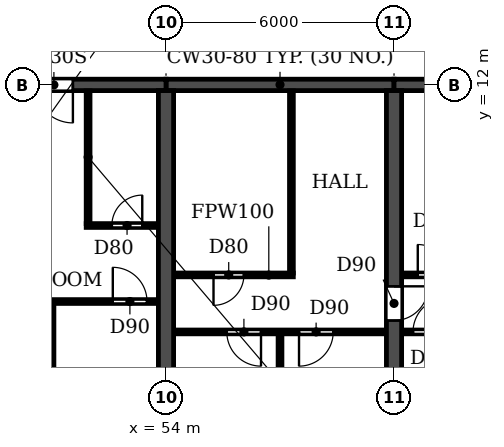
"""IFC4 building model, lengths in metres.
Left out: names, types, materials, properties, quantities, classifications, styles, units other than length and angle.
Written with IfcOpenShell. Run it as: python <this file> out.ifc"""

import sys

from ifc_helpers import new_model, si_unit, direction, frame, frame_2d, origin, place, context, subcontext, project, spatial, rectangle, extrude, element, fill, save


model = new_model("IFC4")
c1 = context("Model", 3, precision=1e-05, world=origin(), true_north=direction((0.0, 1.0)))
c2 = subcontext(c1, "Body", "Model", "MODEL_VIEW")
j1 = project(units=[si_unit("LENGTHUNIT", "METRE"), si_unit("PLANEANGLEUNIT", "RADIAN")], contexts=[c1])
p1 = place(None, origin())
s1 = spatial("IfcSite", under=j1, at=p1, CompositionType="ELEMENT")
p2 = place(p1, origin())
s2 = spatial("IfcBuilding", under=s1, at=p2, CompositionType="ELEMENT")
p3 = place(p2, frame((0.0, 0.0, 23.4)))
s3 = spatial("IfcBuildingStorey", under=s2, at=p3, CompositionType="ELEMENT", Elevation=23.4)
p4 = place(p3, frame((54.0, 0.2, 0.0), z_axis=(0.0, 0.0, 1.0), x_axis=(0.0, 1.0, 0.0)))
e1 = element("IfcWall", 1, at=p4, inside=s3, PredefinedType="SHEAR", context=c2, shape_type="SweptSolid", body=[
    extrude(rectangle(XDim=11.65, YDim=0.4, at=frame_2d((5.825, 0.0))), origin(), (0.0, 0.0, 1.0), 3.05),
])
p5 = place(p3, frame((60.0, 0.2, 0.0), z_axis=(0.0, 0.0, 1.0), x_axis=(0.0, 1.0, 0.0)))
e2 = element("IfcWall", 2, at=p5, inside=s3, PredefinedType="SHEAR", context=c2, shape_type="SweptSolid", body=[
    extrude(rectangle(XDim=11.65, YDim=0.4, at=frame_2d((5.825, 0.0))), origin(), (0.0, 0.0, 1.0), 3.05),
])
p6 = place(p5, frame((5.6, 0.0, 0.0)))
e3 = element("IfcOpeningElement", 3, at=p6, cuts=e2, PredefinedType="OPENING", context=c2, shape_type="SweptSolid", body=[
    extrude(rectangle(XDim=0.9, YDim=2.1, at=frame_2d((0.45, 1.05))), frame((0.0, 0.21, 0.0), z_axis=(0.0, -1.0, 0.0), x_axis=(1.0, 0.0, 0.0)), (0.0, 0.0, 1.0), 0.42),
])
p7 = place(p3, frame((48.0, 12.0, 0.0), z_axis=(0.0, 0.0, 1.0), x_axis=(1.0, 0.0, 0.0)))
e4 = element("IfcWall", 4, at=p7, inside=s3, PredefinedType="SHEAR", context=c2, shape_type="SweptSolid", body=[
    extrude(rectangle(XDim=6.0, YDim=0.3, at=frame_2d((3.0, 0.0))), origin(), (0.0, 0.0, 1.0), 2.45),
])
p8 = place(p7, frame((2.55, 0.0, 0.0)))
e5 = element("IfcOpeningElement", 5, at=p8, cuts=e4, PredefinedType="OPENING", context=c2, shape_type="SweptSolid", body=[
    extrude(rectangle(XDim=1.0, YDim=2.1, at=frame_2d((0.5, 1.05))), frame((0.0, 0.16, 0.0), z_axis=(0.0, -1.0, 0.0), x_axis=(1.0, 0.0, 0.0)), (0.0, 0.0, 1.0), 0.32),
])
p9 = place(p3, frame((54.0, 12.0, 0.0), z_axis=(0.0, 0.0, 1.0), x_axis=(1.0, 0.0, 0.0)))
e6 = element("IfcWall", 6, at=p9, inside=s3, PredefinedType="SHEAR", context=c2, shape_type="SweptSolid", body=[
    extrude(rectangle(XDim=6.0, YDim=0.3, at=frame_2d((3.0, 0.0))), origin(), (0.0, 0.0, 1.0), 2.45),
])
p10 = place(p3, frame((60.0, 12.0, 0.0), z_axis=(0.0, 0.0, 1.0), x_axis=(1.0, 0.0, 0.0)))
e7 = element("IfcWall", 7, at=p10, inside=s3, PredefinedType="SHEAR", context=c2, shape_type="SweptSolid", body=[
    extrude(rectangle(XDim=6.0, YDim=0.3, at=frame_2d((3.0, 0.0))), origin(), (0.0, 0.0, 1.0), 2.45),
])
p11 = place(p10, frame((2.45, 0.0, 0.0)))
e8 = element("IfcOpeningElement", 8, at=p11, cuts=e7, PredefinedType="OPENING", context=c2, shape_type="SweptSolid", body=[
    extrude(rectangle(XDim=1.0, YDim=2.1, at=frame_2d((0.5, 1.05))), frame((0.0, 0.16, 0.0), z_axis=(0.0, -1.0, 0.0), x_axis=(1.0, 0.0, 0.0)), (0.0, 0.0, 1.0), 0.32),
])
p12 = place(p3, frame((54.21, 5.5, 0.0), z_axis=(0.0, 0.0, 1.0), x_axis=(1.0, 0.0, 0.0)))
e9 = element("IfcWall", 9, at=p12, inside=s3, PredefinedType="PARTITIONING", context=c2, shape_type="SweptSolid", body=[
    extrude(rectangle(XDim=5.58, YDim=0.1, at=frame_2d((2.79, 0.0))), origin(), (0.0, 0.0, 1.0), 3.05),
])
p13 = place(p12, frame((1.39, 0.0, 0.0)))
e10 = element("IfcOpeningElement", 10, at=p13, cuts=e9, PredefinedType="OPENING", context=c2, shape_type="SweptSolid", body=[
    extrude(rectangle(XDim=0.9, YDim=2.1, at=frame_2d((0.45, 1.05))), frame((0.0, 0.06, 0.0), z_axis=(0.0, -1.0, 0.0), x_axis=(1.0, 0.0, 0.0)), (0.0, 0.0, 1.0), 0.12),
])
p14 = place(p12, frame((3.29, 0.0, 0.0)))
e11 = element("IfcOpeningElement", 11, at=p14, cuts=e9, PredefinedType="OPENING", context=c2, shape_type="SweptSolid", body=[
    extrude(rectangle(XDim=0.9, YDim=2.1, at=frame_2d((0.45, 1.05))), frame((0.0, 0.06, 0.0), z_axis=(0.0, -1.0, 0.0), x_axis=(1.0, 0.0, 0.0)), (0.0, 0.0, 1.0), 0.12),
])
p15 = place(p3, frame((60.21, 5.5, 0.0), z_axis=(0.0, 0.0, 1.0), x_axis=(1.0, 0.0, 0.0)))
e12 = element("IfcWall", 12, at=p15, inside=s3, PredefinedType="PARTITIONING", context=c2, shape_type="SweptSolid", body=[
    extrude(rectangle(XDim=2.84, YDim=0.1, at=frame_2d((1.42, 0.0))), origin(), (0.0, 0.0, 1.0), 3.05),
])
p16 = place(p15, frame((0.29, 0.0, 0.0)))
e13 = element("IfcOpeningElement", 13, at=p16, cuts=e12, PredefinedType="OPENING", context=c2, shape_type="SweptSolid", body=[
    extrude(rectangle(XDim=0.9, YDim=2.1, at=frame_2d((0.45, 1.05))), frame((0.0, 0.06, 0.0), z_axis=(0.0, -1.0, 0.0), x_axis=(1.0, 0.0, 0.0)), (0.0, 0.0, 1.0), 0.12),
])
p17 = place(p3, frame((50.95, 6.3, 0.0), z_axis=(0.0, 0.0, 1.0), x_axis=(1.0, 0.0, 0.0)))
e14 = element("IfcWall", 14, at=p17, inside=s3, PredefinedType="PARTITIONING", context=c2, shape_type="SweptSolid", body=[
    extrude(rectangle(XDim=2.84, YDim=0.1, at=frame_2d((1.42, 0.0))), origin(), (0.0, 0.0, 1.0), 3.05),
])
p18 = place(p17, frame((1.65, 0.0, 0.0)))
e15 = element("IfcOpeningElement", 15, at=p18, cuts=e14, PredefinedType="OPENING", context=c2, shape_type="SweptSolid", body=[
    extrude(rectangle(XDim=0.9, YDim=2.1, at=frame_2d((0.45, 1.05))), frame((0.0, 0.06, 0.0), z_axis=(0.0, -1.0, 0.0), x_axis=(1.0, 0.0, 0.0)), (0.0, 0.0, 1.0), 0.12),
])
p19 = place(p3, frame((54.21, 7.0, 0.0), z_axis=(0.0, 0.0, 1.0), x_axis=(1.0, 0.0, 0.0)))
e16 = element("IfcWall", 16, at=p19, inside=s3, PredefinedType="PARTITIONING", context=c2, shape_type="SweptSolid", body=[
    extrude(rectangle(XDim=3.14, YDim=0.1, at=frame_2d((1.57, 0.0))), origin(), (0.0, 0.0, 1.0), 3.05),
])
p20 = place(p19, frame((1.04, 0.0, 0.0)))
e17 = element("IfcOpeningElement", 17, at=p20, cuts=e16, PredefinedType="OPENING", context=c2, shape_type="SweptSolid", body=[
    extrude(rectangle(XDim=0.8, YDim=2.1, at=frame_2d((0.4, 1.05))), frame((0.0, 0.06, 0.0), z_axis=(0.0, -1.0, 0.0), x_axis=(1.0, 0.0, 0.0)), (0.0, 0.0, 1.0), 0.12),
])
p21 = place(p3, frame((60.21, 7.0, 0.0), z_axis=(0.0, 0.0, 1.0), x_axis=(1.0, 0.0, 0.0)))
e18 = element("IfcWall", 18, at=p21, inside=s3, PredefinedType="PARTITIONING", context=c2, shape_type="SweptSolid", body=[
    extrude(rectangle(XDim=1.89, YDim=0.1, at=frame_2d((0.945, 0.0))), origin(), (0.0, 0.0, 1.0), 3.05),
])
p22 = place(p21, frame((0.415, 0.0, 0.0)))
e19 = element("IfcOpeningElement", 19, at=p22, cuts=e18, PredefinedType="OPENING", context=c2, shape_type="SweptSolid", body=[
    extrude(rectangle(XDim=0.8, YDim=2.1, at=frame_2d((0.4, 1.05))), frame((0.0, 0.06, 0.0), z_axis=(0.0, -1.0, 0.0), x_axis=(1.0, 0.0, 0.0)), (0.0, 0.0, 1.0), 0.12),
])
p23 = place(p3, frame((51.9, 8.3, 0.0), z_axis=(0.0, 0.0, 1.0), x_axis=(1.0, 0.0, 0.0)))
e20 = element("IfcWall", 20, at=p23, inside=s3, PredefinedType="PARTITIONING", context=c2, shape_type="SweptSolid", body=[
    extrude(rectangle(XDim=1.89, YDim=0.1, at=frame_2d((0.945, 0.0))), origin(), (0.0, 0.0, 1.0), 3.05),
])
p24 = place(p23, frame((0.675, 0.0, 0.0)))
e21 = element("IfcOpeningElement", 21, at=p24, cuts=e20, PredefinedType="OPENING", context=c2, shape_type="SweptSolid", body=[
    extrude(rectangle(XDim=0.8, YDim=2.1, at=frame_2d((0.4, 1.05))), frame((0.0, 0.06, 0.0), z_axis=(0.0, -1.0, 0.0), x_axis=(1.0, 0.0, 0.0)), (0.0, 0.0, 1.0), 0.12),
])
p25 = place(p3, frame((51.0, 0.06, 0.0), z_axis=(0.0, 0.0, 1.0), x_axis=(0.0, 1.0, 0.0)))
e22 = element("IfcWall", 22, at=p25, inside=s3, PredefinedType="PARTITIONING", context=c2, shape_type="SweptSolid", body=[
    extrude(rectangle(XDim=6.19, YDim=0.1, at=frame_2d((3.095, 0.0))), origin(), (0.0, 0.0, 1.0), 3.05),
])
p26 = place(p3, frame((51.95, 8.35, 0.0), z_axis=(0.0, 0.0, 1.0), x_axis=(0.0, 1.0, 0.0)))
e23 = element("IfcWall", 23, at=p26, inside=s3, PredefinedType="PARTITIONING", context=c2, shape_type="SweptSolid", body=[
    extrude(rectangle(XDim=3.49, YDim=0.1, at=frame_2d((1.745, 0.0))), origin(), (0.0, 0.0, 1.0), 3.05),
])
p27 = place(p3, frame((57.0, 0.06, 0.0), z_axis=(0.0, 0.0, 1.0), x_axis=(0.0, 1.0, 0.0)))
e24 = element("IfcWall", 24, at=p27, inside=s3, PredefinedType="PARTITIONING", context=c2, shape_type="SweptSolid", body=[
    extrude(rectangle(XDim=5.39, YDim=0.1, at=frame_2d((2.695, 0.0))), origin(), (0.0, 0.0, 1.0), 3.05),
])
p28 = place(p3, frame((57.3, 7.05, 0.0), z_axis=(0.0, 0.0, 1.0), x_axis=(0.0, 1.0, 0.0)))
e25 = element("IfcWall", 25, at=p28, inside=s3, PredefinedType="PARTITIONING", context=c2, shape_type="SweptSolid", body=[
    extrude(rectangle(XDim=4.79, YDim=0.1, at=frame_2d((2.395, 0.0))), origin(), (0.0, 0.0, 1.0), 3.05),
])
p29 = place(p8, frame((1.0, 0.0, 0.0), z_axis=(0.0, 0.0, 1.0), x_axis=(-1.0, 0.0, 0.0)))
e26 = element("IfcDoor", 26, at=p29, inside=s3, OperationType="SINGLE_SWING_LEFT", PredefinedType="DOOR", context=c2, shape_type="SweptSolid", body=[
    extrude(rectangle(XDim=1.0, YDim=2.1, at=frame_2d((0.5, 1.05))), frame((0.0, 0.025, 0.0), z_axis=(0.0, -1.0, 0.0), x_axis=(1.0, 0.0, 0.0)), (0.0, 0.0, 1.0), 0.05),
])
fill(e5, e26)
p30 = place(p24, origin())
e27 = element("IfcDoor", 27, at=p30, inside=s3, OperationType="SINGLE_SWING_RIGHT", PredefinedType="DOOR", context=c2, shape_type="SweptSolid", body=[
    extrude(rectangle(XDim=0.8, YDim=2.1, at=frame_2d((0.4, 1.05))), frame((0.0, 0.025, 0.0), z_axis=(0.0, -1.0, 0.0), x_axis=(1.0, 0.0, 0.0)), (0.0, 0.0, 1.0), 0.05),
])
fill(e21, e27)
p31 = place(p18, origin())
e28 = element("IfcDoor", 28, at=p31, inside=s3, OperationType="SINGLE_SWING_LEFT", PredefinedType="DOOR", context=c2, shape_type="SweptSolid", body=[
    extrude(rectangle(XDim=0.9, YDim=2.1, at=frame_2d((0.45, 1.05))), frame((0.0, 0.025, 0.0), z_axis=(0.0, -1.0, 0.0), x_axis=(1.0, 0.0, 0.0)), (0.0, 0.0, 1.0), 0.05),
])
fill(e15, e28)
p32 = place(p20, frame((0.8, 0.0, 0.0), z_axis=(0.0, 0.0, 1.0), x_axis=(-1.0, 0.0, 0.0)))
e29 = element("IfcDoor", 29, at=p32, inside=s3, OperationType="SINGLE_SWING_RIGHT", PredefinedType="DOOR", context=c2, shape_type="SweptSolid", body=[
    extrude(rectangle(XDim=0.8, YDim=2.1, at=frame_2d((0.4, 1.05))), frame((0.0, 0.025, 0.0), z_axis=(0.0, -1.0, 0.0), x_axis=(1.0, 0.0, 0.0)), (0.0, 0.0, 1.0), 0.05),
])
fill(e17, e29)
p33 = place(p13, frame((0.9, 0.0, 0.0), z_axis=(0.0, 0.0, 1.0), x_axis=(-1.0, 0.0, 0.0)))
e30 = element("IfcDoor", 30, at=p33, inside=s3, OperationType="SINGLE_SWING_LEFT", PredefinedType="DOOR", context=c2, shape_type="SweptSolid", body=[
    extrude(rectangle(XDim=0.9, YDim=2.1, at=frame_2d((0.45, 1.05))), frame((0.0, 0.025, 0.0), z_axis=(0.0, -1.0, 0.0), x_axis=(1.0, 0.0, 0.0)), (0.0, 0.0, 1.0), 0.05),
])
fill(e10, e30)
p34 = place(p14, frame((0.9, 0.0, 0.0), z_axis=(0.0, 0.0, 1.0), x_axis=(-1.0, 0.0, 0.0)))
e31 = element("IfcDoor", 31, at=p34, inside=s3, OperationType="SINGLE_SWING_RIGHT", PredefinedType="DOOR", context=c2, shape_type="SweptSolid", body=[
    extrude(rectangle(XDim=0.9, YDim=2.1, at=frame_2d((0.45, 1.05))), frame((0.0, 0.025, 0.0), z_axis=(0.0, -1.0, 0.0), x_axis=(1.0, 0.0, 0.0)), (0.0, 0.0, 1.0), 0.05),
])
fill(e11, e31)
p35 = place(p6, frame((0.9, 0.0, 0.0), z_axis=(0.0, 0.0, 1.0), x_axis=(-1.0, 0.0, 0.0)))
e32 = element("IfcDoor", 32, at=p35, inside=s3, OperationType="SINGLE_SWING_LEFT", PredefinedType="DOOR", context=c2, shape_type="SweptSolid", body=[
    extrude(rectangle(XDim=0.9, YDim=2.1, at=frame_2d((0.45, 1.05))), frame((0.0, 0.025, 0.0), z_axis=(0.0, -1.0, 0.0), x_axis=(1.0, 0.0, 0.0)), (0.0, 0.0, 1.0), 0.05),
])
fill(e3, e32)
p36 = place(p16, origin())
e33 = element("IfcDoor", 33, at=p36, inside=s3, OperationType="SINGLE_SWING_RIGHT", PredefinedType="DOOR", context=c2, shape_type="SweptSolid", body=[
    extrude(rectangle(XDim=0.9, YDim=2.1, at=frame_2d((0.45, 1.05))), frame((0.0, 0.025, 0.0), z_axis=(0.0, -1.0, 0.0), x_axis=(1.0, 0.0, 0.0)), (0.0, 0.0, 1.0), 0.05),
])
fill(e13, e33)
p37 = place(p22, origin())
e34 = element("IfcDoor", 34, at=p37, inside=s3, OperationType="SINGLE_SWING_LEFT", PredefinedType="DOOR", context=c2, shape_type="SweptSolid", body=[
    extrude(rectangle(XDim=0.8, YDim=2.1, at=frame_2d((0.4, 1.05))), frame((0.0, 0.025, 0.0), z_axis=(0.0, -1.0, 0.0), x_axis=(1.0, 0.0, 0.0)), (0.0, 0.0, 1.0), 0.05),
])
fill(e19, e34)
save(model, sys.argv[1])
